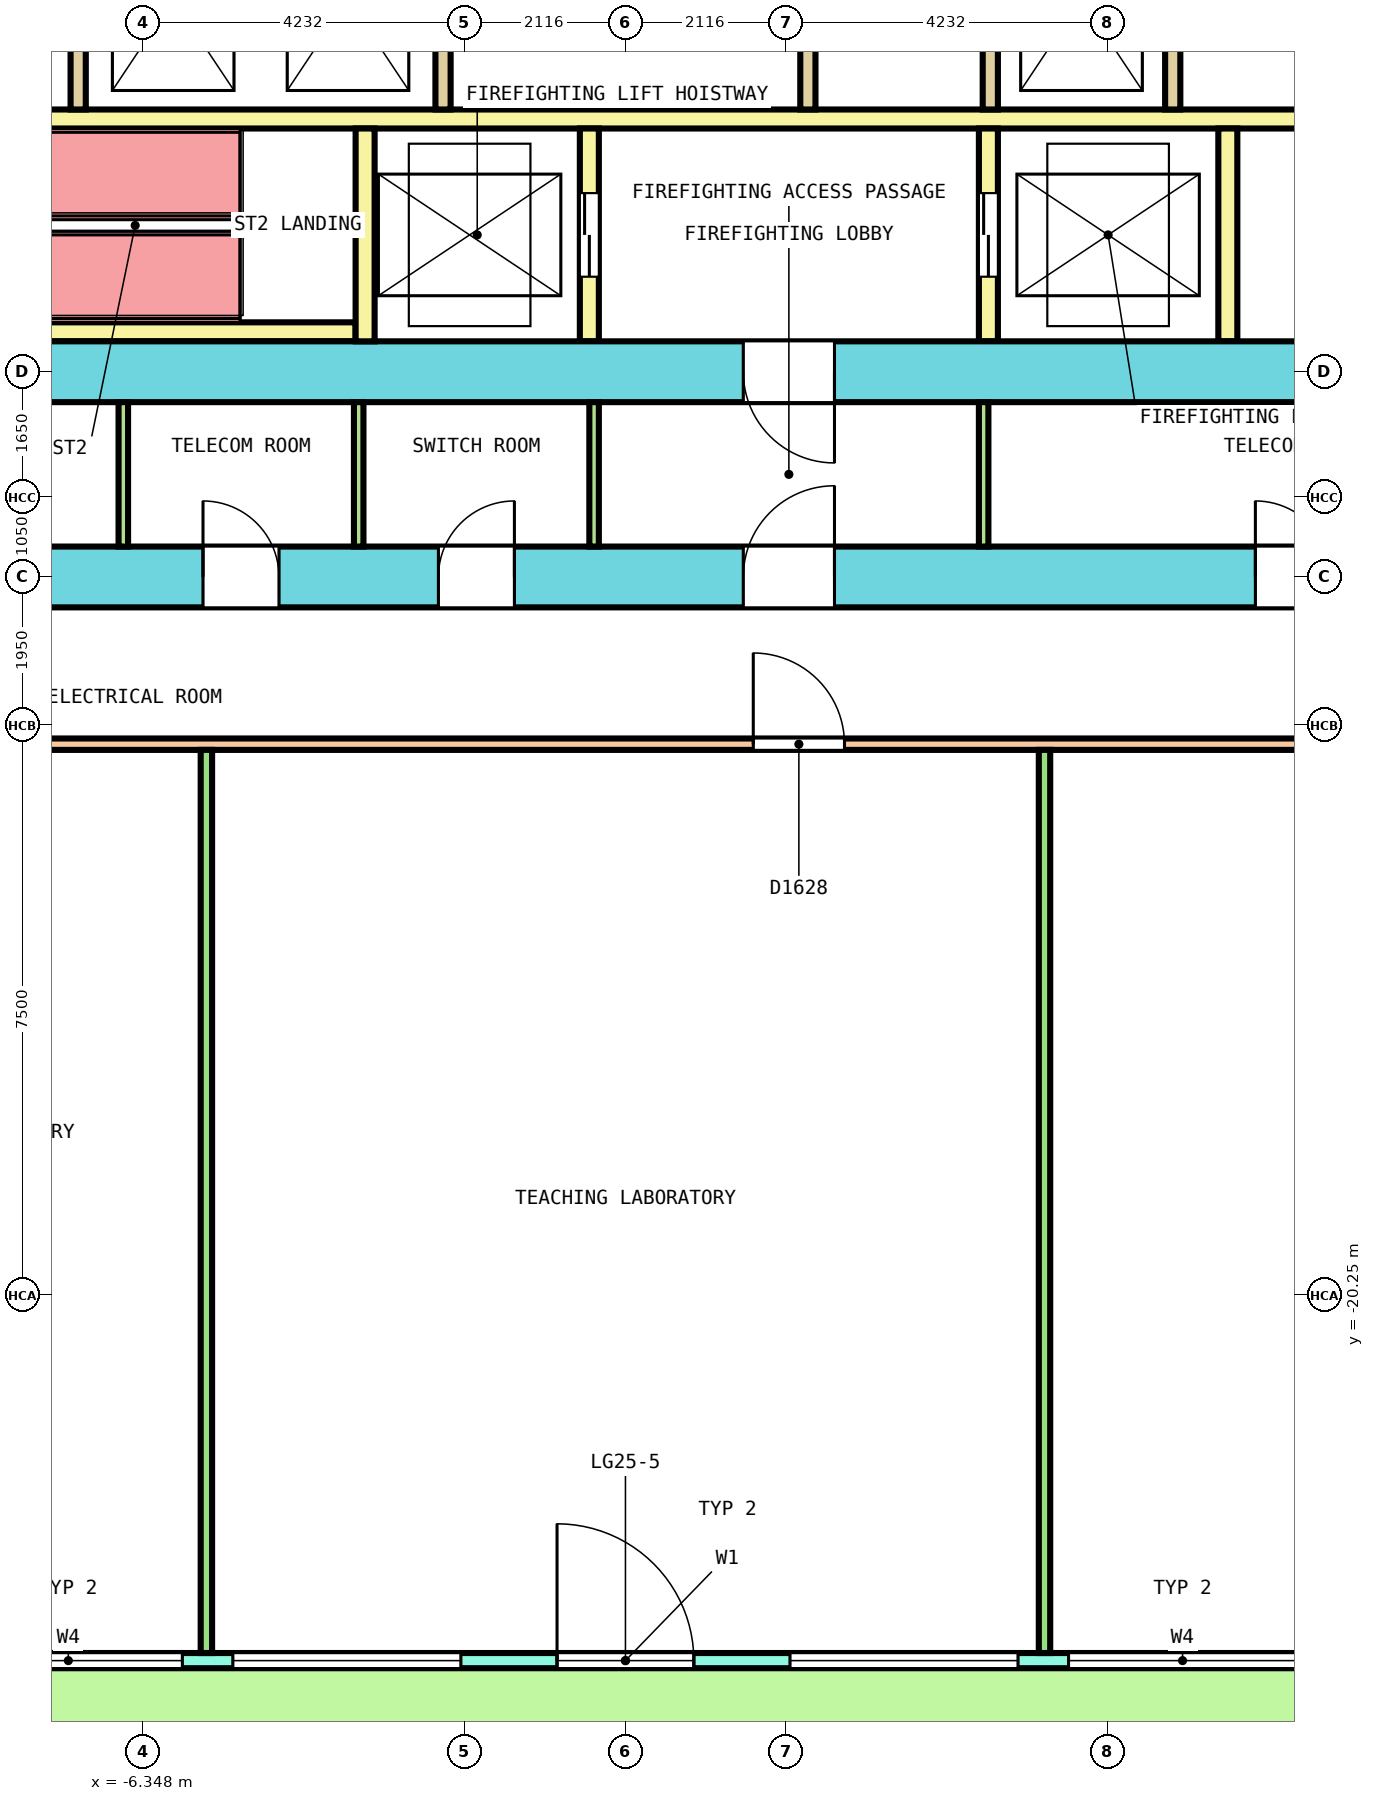
"""IFC4 building model, lengths in metres.
Left out: names, types, materials, properties, quantities, classifications, styles, units other than length and angle.
Written with IfcOpenShell. Run it as: python <this file> out.ifc"""

import sys

from ifc_helpers import new_model, si_unit, direction, frame, frame_2d, origin, place, context, subcontext, project, spatial, polyline, rectangle, outline, extrude, element, fill, save


model = new_model("IFC4")
c1 = context("Model", 3, precision=1e-05, world=origin(), true_north=direction((0.0, 1.0)))
c2 = subcontext(c1, "Body", "Model", "MODEL_VIEW")
j1 = project(units=[si_unit("LENGTHUNIT", "METRE"), si_unit("PLANEANGLEUNIT", "RADIAN")], contexts=[c1])
p1 = place(None, origin())
s1 = spatial("IfcSite", under=j1, at=p1, CompositionType="ELEMENT")
p2 = place(p1, origin())
s2 = spatial("IfcBuilding", under=s1, at=p2, CompositionType="ELEMENT")
p3 = place(p2, frame((0.0, 0.0, 117.6)))
s3 = spatial("IfcBuildingStorey", under=s2, at=p3, CompositionType="ELEMENT", Elevation=117.6)
p4 = place(p3, frame((-9.162, -25.056, 0.0), z_axis=(0.0, 0.0, 1.0), x_axis=(1.0, 0.0, 0.0)))
e1 = element("IfcWall", 1, at=p4, inside=s3, PredefinedType="SOLIDWALL", context=c2, shape_type="SweptSolid", body=[
    extrude(outline(polyline([(-0.027, -0.1), (0.994, -0.1), (2.015, -0.1), (3.036, -0.1), (4.057, -0.1), (5.078, -0.1), (6.099, -0.1), (7.12, -0.1), (8.141, -0.1), (9.162, -0.1), (10.183, -0.1), (11.204, -0.1), (12.225, -0.1), (13.246, -0.1), (14.267, -0.1), (15.288, -0.1), (16.309, -0.1), (17.33, -0.1), (18.351, -0.1), (18.297, 0.1), (17.282, 0.1), (16.267, 0.1), (15.252, 0.1), (14.237, 0.1), (13.222, 0.1), (12.207, 0.1), (11.192, 0.1), (10.177, 0.1), (9.162, 0.1), (8.147, 0.1), (7.132, 0.1), (6.117, 0.1), (5.102, 0.1), (4.087, 0.1), (3.072, 0.1), (2.057, 0.1), (1.042, 0.1), (0.027, 0.1), (-0.027, -0.1)])), origin(), (0.0, 0.0, 1.0), 4.1),
])
p5 = place(p4, frame((0.333, 0.0, 0.1)))
e2 = element("IfcOpeningElement", 2, at=p5, cuts=e1, PredefinedType="OPENING", context=c2, shape_type="SweptSolid", body=[
    extrude(rectangle(XDim=3.0, YDim=2.9, at=frame_2d((1.5, 1.45))), frame((0.0, 0.11, 0.0), z_axis=(0.0, -1.0, 0.0), x_axis=(1.0, 0.0, 0.0)), (0.0, 0.0, 1.0), 0.22),
])
p6 = place(p4, frame((3.997, 0.0, 0.1)))
e3 = element("IfcOpeningElement", 3, at=p6, cuts=e1, PredefinedType="OPENING", context=c2, shape_type="SweptSolid", body=[
    extrude(rectangle(XDim=3.0, YDim=2.9, at=frame_2d((1.5, 1.45))), frame((0.0, 0.11, 0.0), z_axis=(0.0, -1.0, 0.0), x_axis=(1.0, 0.0, 0.0)), (0.0, 0.0, 1.0), 0.22),
])
p7 = place(p4, frame((8.262, 0.0, 0.0)))
e4 = element("IfcOpeningElement", 4, at=p7, cuts=e1, PredefinedType="OPENING", context=c2, shape_type="SweptSolid", body=[
    extrude(rectangle(XDim=1.8, YDim=2.4, at=frame_2d((0.9, 1.2))), frame((0.0, 0.11, 0.0), z_axis=(0.0, -1.0, 0.0), x_axis=(1.0, 0.0, 0.0)), (0.0, 0.0, 1.0), 0.22),
])
p8 = place(p4, frame((8.262, 0.0, 2.55)))
e5 = element("IfcOpeningElement", 5, at=p8, cuts=e1, PredefinedType="OPENING", context=c2, shape_type="SweptSolid", body=[
    extrude(rectangle(XDim=1.8, YDim=0.45, at=frame_2d((0.9, 0.225))), frame((0.0, 0.11, 0.0), z_axis=(0.0, -1.0, 0.0), x_axis=(1.0, 0.0, 0.0)), (0.0, 0.0, 1.0), 0.22),
])
p9 = place(p4, frame((11.327, 0.0, 0.1)))
e6 = element("IfcOpeningElement", 6, at=p9, cuts=e1, PredefinedType="OPENING", context=c2, shape_type="SweptSolid", body=[
    extrude(rectangle(XDim=3.0, YDim=2.9, at=frame_2d((1.5, 1.45))), frame((0.0, 0.11, 0.0), z_axis=(0.0, -1.0, 0.0), x_axis=(1.0, 0.0, 0.0)), (0.0, 0.0, 1.0), 0.22),
])
p10 = place(p4, frame((14.991, 0.0, 0.1)))
e7 = element("IfcOpeningElement", 7, at=p10, cuts=e1, PredefinedType="OPENING", context=c2, shape_type="SweptSolid", body=[
    extrude(rectangle(XDim=3.0, YDim=2.9, at=frame_2d((1.5, 1.45))), frame((0.0, 0.11, 0.0), z_axis=(0.0, -1.0, 0.0), x_axis=(1.0, 0.0, 0.0)), (0.0, 0.0, 1.0), 0.22),
])
p11 = place(p3, frame((-13.6, -10.8, 0.0), z_axis=(0.0, 0.0, 1.0), x_axis=(1.0, 0.0, 0.0)))
e8 = element("IfcWall", 8, at=p11, inside=s3, PredefinedType="SHEAR", context=c2, shape_type="SweptSolid", body=[
    extrude(rectangle(XDim=27.2, YDim=0.8, at=frame_2d((13.6, 0.0))), origin(), (0.0, 0.0, 1.0), 4.1),
])
p12 = place(p11, frame((1.817, 0.0, 0.0)))
e9 = element("IfcOpeningElement", 9, at=p12, cuts=e8, PredefinedType="OPENING", context=c2, shape_type="SweptSolid", body=[
    extrude(rectangle(XDim=1.0, YDim=2.1, at=frame_2d((0.5, 1.05))), frame((0.0, 0.41, 0.0), z_axis=(0.0, -1.0, 0.0), x_axis=(1.0, 0.0, 0.0)), (0.0, 0.0, 1.0), 0.82),
])
p13 = place(p11, frame((4.945, 0.0, 0.0)))
e10 = element("IfcOpeningElement", 10, at=p13, cuts=e8, PredefinedType="OPENING", context=c2, shape_type="SweptSolid", body=[
    extrude(rectangle(XDim=1.0, YDim=2.1, at=frame_2d((0.5, 1.05))), frame((0.0, 0.41, 0.0), z_axis=(0.0, -1.0, 0.0), x_axis=(1.0, 0.0, 0.0)), (0.0, 0.0, 1.0), 0.82),
])
p14 = place(p11, frame((8.042, 0.0, 0.0)))
e11 = element("IfcOpeningElement", 11, at=p14, cuts=e8, PredefinedType="OPENING", context=c2, shape_type="SweptSolid", body=[
    extrude(rectangle(XDim=1.0, YDim=2.1, at=frame_2d((0.5, 1.05))), frame((0.0, 0.41, 0.0), z_axis=(0.0, -1.0, 0.0), x_axis=(1.0, 0.0, 0.0)), (0.0, 0.0, 1.0), 0.82),
])
p15 = place(p11, frame((11.139, 0.0, 0.0)))
e12 = element("IfcOpeningElement", 12, at=p15, cuts=e8, PredefinedType="OPENING", context=c2, shape_type="SweptSolid", body=[
    extrude(rectangle(XDim=1.0, YDim=2.1, at=frame_2d((0.5, 1.05))), frame((0.0, 0.41, 0.0), z_axis=(0.0, -1.0, 0.0), x_axis=(1.0, 0.0, 0.0)), (0.0, 0.0, 1.0), 0.82),
])
p16 = place(p11, frame((21.887, 0.0, 0.0)))
e13 = element("IfcOpeningElement", 13, at=p16, cuts=e8, PredefinedType="OPENING", context=c2, shape_type="SweptSolid", body=[
    extrude(rectangle(XDim=1.0, YDim=2.1, at=frame_2d((0.5, 1.05))), frame((0.0, 0.41, 0.0), z_axis=(0.0, -1.0, 0.0), x_axis=(1.0, 0.0, 0.0)), (0.0, 0.0, 1.0), 0.82),
])
p17 = place(p11, frame((15.15, 0.0, 0.0)))
e14 = element("IfcOpeningElement", 14, at=p17, cuts=e8, PredefinedType="OPENING", context=c2, shape_type="SweptSolid", body=[
    extrude(rectangle(XDim=1.2, YDim=2.1, at=frame_2d((0.6, 1.05))), frame((0.0, 0.41, 0.0), z_axis=(0.0, -1.0, 0.0), x_axis=(1.0, 0.0, 0.0)), (0.0, 0.0, 1.0), 0.82),
])
p18 = place(p3, frame((-12.8, -8.1, 0.0), z_axis=(0.0, 0.0, 1.0), x_axis=(1.0, 0.0, 0.0)))
e15 = element("IfcWall", 15, at=p18, inside=s3, PredefinedType="SHEAR", context=c2, shape_type="SweptSolid", body=[
    extrude(rectangle(XDim=25.6, YDim=0.8, at=frame_2d((12.8, 0.0))), origin(), (0.0, 0.0, 1.0), 4.1),
])
p19 = place(p18, frame((14.35, 0.0, 0.0)))
e16 = element("IfcOpeningElement", 16, at=p19, cuts=e15, PredefinedType="OPENING", context=c2, shape_type="SweptSolid", body=[
    extrude(rectangle(XDim=1.2, YDim=2.1, at=frame_2d((0.6, 1.05))), frame((0.0, 0.41, 0.0), z_axis=(0.0, -1.0, 0.0), x_axis=(1.0, 0.0, 0.0)), (0.0, 0.0, 1.0), 0.82),
])
p20 = place(p3, frame((-9.35, -4.775, 0.0), z_axis=(0.0, 0.0, 1.0), x_axis=(1.0, 0.0, 0.0)))
e17 = element("IfcWall", 17, at=p20, inside=s3, PredefinedType="SOLIDWALL", context=c2, shape_type="SweptSolid", body=[
    extrude(rectangle(XDim=18.7, YDim=0.25, at=frame_2d((9.35, 0.0))), origin(), (0.0, 0.0, 1.0), 4.1),
])
for number, where, z_axis, x_axis in (
    (18, (-7.2, -4.65, 0.0), (0.0, 0.0, 1.0), (0.0, 1.0, 0.0)),
    (19, (-2.4, -4.65, 0.0), (0.0, 0.0, 1.0), (0.0, 1.0, 0.0)),
    (20, (2.4, -4.65, 0.0), (0.0, 0.0, 1.0), (0.0, 1.0, 0.0)),
    (21, (4.8, -4.65, 0.0), (0.0, 0.0, 1.0), (0.0, 1.0, 0.0)),
    (22, (7.2, -4.65, 0.0), (0.0, 0.0, 1.0), (0.0, 1.0, 0.0)),
):
    element("IfcWall", number, at=place(p3, frame(where, z_axis=z_axis, x_axis=x_axis)), inside=s3, PredefinedType="SOLIDWALL", context=c2, shape_type="SweptSolid", body=[
        extrude(rectangle(XDim=2.9, YDim=0.2, at=frame_2d((1.45, 0.0))), origin(), (0.0, 0.0, 1.0), 4.1),
    ])
p21 = place(p3, frame((-9.35, -7.575, 0.0), z_axis=(0.0, 0.0, 1.0), x_axis=(1.0, 0.0, 0.0)))
e23 = element("IfcWall", 23, at=p21, inside=s3, PredefinedType="SOLIDWALL", context=c2, shape_type="SweptSolid", body=[
    extrude(rectangle(XDim=5.8, YDim=0.25, at=frame_2d((2.9, 0.0))), origin(), (0.0, 0.0, 1.0), 4.1),
])
p22 = place(p3, frame((-3.425, -7.7, 0.0), z_axis=(0.0, 0.0, 1.0), x_axis=(0.0, 1.0, 0.0)))
e24 = element("IfcWall", 24, at=p22, inside=s3, PredefinedType="SOLIDWALL", context=c2, shape_type="SweptSolid", body=[
    extrude(rectangle(XDim=2.8, YDim=0.25, at=frame_2d((1.4, 0.0))), origin(), (0.0, 0.0, 1.0), 4.1),
])
p23 = place(p3, frame((-0.475, -7.7, 0.0), z_axis=(0.0, 0.0, 1.0), x_axis=(0.0, 1.0, 0.0)))
e25 = element("IfcWall", 25, at=p23, inside=s3, PredefinedType="SOLIDWALL", context=c2, shape_type="SweptSolid", body=[
    extrude(rectangle(XDim=2.8, YDim=0.25, at=frame_2d((1.4, 0.0))), origin(), (0.0, 0.0, 1.0), 4.1),
])
p24 = place(p23, frame((0.85, 0.0, 0.0)))
e26 = element("IfcOpeningElement", 26, at=p24, cuts=e25, PredefinedType="OPENING", context=c2, shape_type="SweptSolid", body=[
    extrude(rectangle(XDim=1.1, YDim=2.1, at=frame_2d((0.55, 1.05))), frame((0.0, 0.135, 0.0), z_axis=(0.0, -1.0, 0.0), x_axis=(1.0, 0.0, 0.0)), (0.0, 0.0, 1.0), 0.27),
])
p25 = place(p3, frame((4.775, -7.7, 0.0), z_axis=(0.0, 0.0, 1.0), x_axis=(0.0, 1.0, 0.0)))
e27 = element("IfcWall", 27, at=p25, inside=s3, PredefinedType="SOLIDWALL", context=c2, shape_type="SweptSolid", body=[
    extrude(rectangle(XDim=2.8, YDim=0.25, at=frame_2d((1.4, 0.0))), origin(), (0.0, 0.0, 1.0), 4.1),
])
p26 = place(p25, frame((0.85, 0.0, 0.0)))
e28 = element("IfcOpeningElement", 28, at=p26, cuts=e27, PredefinedType="OPENING", context=c2, shape_type="SweptSolid", body=[
    extrude(rectangle(XDim=1.1, YDim=2.1, at=frame_2d((0.55, 1.05))), frame((0.0, 0.135, 0.0), z_axis=(0.0, -1.0, 0.0), x_axis=(1.0, 0.0, 0.0)), (0.0, 0.0, 1.0), 0.27),
])
p27 = place(p3, frame((7.925, -7.7, 0.0), z_axis=(0.0, 0.0, 1.0), x_axis=(0.0, 1.0, 0.0)))
e29 = element("IfcWall", 29, at=p27, inside=s3, PredefinedType="SOLIDWALL", context=c2, shape_type="SweptSolid", body=[
    extrude(rectangle(XDim=2.8, YDim=0.25, at=frame_2d((1.4, 0.0))), origin(), (0.0, 0.0, 1.0), 4.1),
])
for number, where, z_axis, x_axis in (
    (30, (-6.606, -10.4, 0.0), (0.0, 0.0, 1.0), (0.0, 1.0, 0.0)),
    (31, (-3.51, -10.4, 0.0), (0.0, 0.0, 1.0), (0.0, 1.0, 0.0)),
    (32, (-0.413, -10.4, 0.0), (0.0, 0.0, 1.0), (0.0, 1.0, 0.0)),
    (33, (4.712, -10.4, 0.0), (0.0, 0.0, 1.0), (0.0, 1.0, 0.0)),
):
    element("IfcWall", number, at=place(p3, frame(where, z_axis=z_axis, x_axis=x_axis)), inside=s3, PredefinedType="PARTITIONING", context=c2, shape_type="SweptSolid", body=[
        extrude(rectangle(XDim=1.9, YDim=0.125, at=frame_2d((0.95, 0.0))), origin(), (0.0, 0.0, 1.0), 3.05),
    ])
p28 = place(p3, frame((-15.35, -13.0, 0.0), z_axis=(0.0, 0.0, 1.0), x_axis=(1.0, 0.0, 0.0)))
e34 = element("IfcWall", 34, at=p28, inside=s3, PredefinedType="PARTITIONING", context=c2, shape_type="SweptSolid", body=[
    extrude(rectangle(XDim=30.675, YDim=0.15, at=frame_2d((15.337, 0.0))), origin(), (0.0, 0.0, 1.0), 3.05),
])
p29 = place(p28, frame((1.434, 0.0, 0.0)))
e35 = element("IfcOpeningElement", 35, at=p29, cuts=e34, PredefinedType="OPENING", context=c2, shape_type="SweptSolid", body=[
    extrude(rectangle(XDim=1.0, YDim=2.1, at=frame_2d((0.5, 1.05))), frame((0.0, 0.085, 0.0), z_axis=(0.0, -1.0, 0.0), x_axis=(1.0, 0.0, 0.0)), (0.0, 0.0, 1.0), 0.17),
])
p30 = place(p28, frame((5.183, 0.0, 0.0)))
e36 = element("IfcOpeningElement", 36, at=p30, cuts=e34, PredefinedType="OPENING", context=c2, shape_type="SweptSolid", body=[
    extrude(rectangle(XDim=1.2, YDim=2.1, at=frame_2d((0.6, 1.05))), frame((0.0, 0.085, 0.0), z_axis=(0.0, -1.0, 0.0), x_axis=(1.0, 0.0, 0.0)), (0.0, 0.0, 1.0), 0.17),
])
p31 = place(p28, frame((17.031, 0.0, 0.0)))
e37 = element("IfcOpeningElement", 37, at=p31, cuts=e34, PredefinedType="OPENING", context=c2, shape_type="SweptSolid", body=[
    extrude(rectangle(XDim=1.2, YDim=2.1, at=frame_2d((0.6, 1.05))), frame((0.0, 0.085, 0.0), z_axis=(0.0, -1.0, 0.0), x_axis=(1.0, 0.0, 0.0)), (0.0, 0.0, 1.0), 0.17),
])
p32 = place(p28, frame((26.405, 0.0, 0.0)))
e38 = element("IfcOpeningElement", 38, at=p32, cuts=e34, PredefinedType="OPENING", context=c2, shape_type="SweptSolid", body=[
    extrude(rectangle(XDim=1.2, YDim=2.1, at=frame_2d((0.6, 1.05))), frame((0.0, 0.085, 0.0), z_axis=(0.0, -1.0, 0.0), x_axis=(1.0, 0.0, 0.0)), (0.0, 0.0, 1.0), 0.17),
])
for number, where, z_axis, x_axis in (
    (39, (-5.513, -24.957, 0.0), (0.0, 0.0, 1.0), (0.0, 1.0, 0.0)),
    (40, (5.513, -24.957, 0.0), (0.0, 0.0, 1.0), (0.0, 1.0, 0.0)),
):
    element("IfcWall", number, at=place(p3, frame(where, z_axis=z_axis, x_axis=x_axis)), inside=s3, PredefinedType="PARTITIONING", context=c2, shape_type="SweptSolid", body=[
        extrude(rectangle(XDim=11.882, YDim=0.15, at=frame_2d((5.941, 0.0))), origin(), (0.0, 0.0, 1.0), 3.05),
    ])
p33 = place(p5, origin())
e41 = element("IfcWindow", 41, at=p33, inside=s3, PartitioningType="SINGLE_PANEL", PredefinedType="WINDOW", context=c2, shape_type="SweptSolid", body=[
    extrude(rectangle(XDim=3.0, YDim=2.9, at=frame_2d((1.5, 1.45))), frame((0.0, 0.03, 0.0), z_axis=(0.0, -1.0, 0.0), x_axis=(1.0, 0.0, 0.0)), (0.0, 0.0, 1.0), 0.06),
])
fill(e2, e41)
p34 = place(p6, origin())
e42 = element("IfcWindow", 42, at=p34, inside=s3, PartitioningType="SINGLE_PANEL", PredefinedType="WINDOW", context=c2, shape_type="SweptSolid", body=[
    extrude(rectangle(XDim=3.0, YDim=2.9, at=frame_2d((1.5, 1.45))), frame((0.0, 0.03, 0.0), z_axis=(0.0, -1.0, 0.0), x_axis=(1.0, 0.0, 0.0)), (0.0, 0.0, 1.0), 0.06),
])
fill(e3, e42)
p35 = place(p7, origin())
e43 = element("IfcDoor", 43, at=p35, inside=s3, OperationType="DOUBLE_DOOR_SINGLE_SWING", PredefinedType="DOOR", context=c2, shape_type="SweptSolid", body=[
    extrude(rectangle(XDim=1.8, YDim=2.4, at=frame_2d((0.9, 1.2))), frame((0.0, 0.025, 0.0), z_axis=(0.0, -1.0, 0.0), x_axis=(1.0, 0.0, 0.0)), (0.0, 0.0, 1.0), 0.05),
])
fill(e4, e43)
p36 = place(p8, origin())
e44 = element("IfcWindow", 44, at=p36, inside=s3, PartitioningType="SINGLE_PANEL", PredefinedType="WINDOW", context=c2, shape_type="SweptSolid", body=[
    extrude(rectangle(XDim=1.8, YDim=0.45, at=frame_2d((0.9, 0.225))), frame((0.0, 0.03, 0.0), z_axis=(0.0, -1.0, 0.0), x_axis=(1.0, 0.0, 0.0)), (0.0, 0.0, 1.0), 0.06),
])
fill(e5, e44)
p37 = place(p9, origin())
e45 = element("IfcWindow", 45, at=p37, inside=s3, PartitioningType="SINGLE_PANEL", PredefinedType="WINDOW", context=c2, shape_type="SweptSolid", body=[
    extrude(rectangle(XDim=3.0, YDim=2.9, at=frame_2d((1.5, 1.45))), frame((0.0, 0.03, 0.0), z_axis=(0.0, -1.0, 0.0), x_axis=(1.0, 0.0, 0.0)), (0.0, 0.0, 1.0), 0.06),
])
fill(e6, e45)
p38 = place(p10, origin())
e46 = element("IfcWindow", 46, at=p38, inside=s3, PartitioningType="SINGLE_PANEL", PredefinedType="WINDOW", context=c2, shape_type="SweptSolid", body=[
    extrude(rectangle(XDim=3.0, YDim=2.9, at=frame_2d((1.5, 1.45))), frame((0.0, 0.03, 0.0), z_axis=(0.0, -1.0, 0.0), x_axis=(1.0, 0.0, 0.0)), (0.0, 0.0, 1.0), 0.06),
])
fill(e7, e46)
p39 = place(p24, origin())
e47 = element("IfcDoor", 47, at=p39, inside=s3, OperationType="DOUBLE_DOOR_SLIDING", PredefinedType="DOOR", context=c2, shape_type="SweptSolid", body=[
    extrude(rectangle(XDim=1.1, YDim=2.1, at=frame_2d((0.55, 1.05))), frame((0.0, 0.075, 0.0), z_axis=(0.0, -1.0, 0.0), x_axis=(1.0, 0.0, 0.0)), (0.0, 0.0, 1.0), 0.15),
])
fill(e26, e47)
p40 = place(p26, origin())
e48 = element("IfcDoor", 48, at=p40, inside=s3, OperationType="DOUBLE_DOOR_SLIDING", PredefinedType="DOOR", context=c2, shape_type="SweptSolid", body=[
    extrude(rectangle(XDim=1.1, YDim=2.1, at=frame_2d((0.55, 1.05))), frame((0.0, 0.075, 0.0), z_axis=(0.0, -1.0, 0.0), x_axis=(1.0, 0.0, 0.0)), (0.0, 0.0, 1.0), 0.15),
])
fill(e28, e48)
p41 = place(p19, origin())
e49 = element("IfcDoor", 49, at=p41, inside=s3, OperationType="SINGLE_SWING_LEFT", PredefinedType="DOOR", context=c2, shape_type="SweptSolid", body=[
    extrude(rectangle(XDim=1.2, YDim=2.1, at=frame_2d((0.6, 1.05))), frame((0.0, 0.3, 0.0), z_axis=(0.0, -1.0, 0.0), x_axis=(1.0, 0.0, 0.0)), (0.0, 0.0, 1.0), 0.6),
])
fill(e16, e49)
p42 = place(p14, origin())
e50 = element("IfcDoor", 50, at=p42, inside=s3, OperationType="SINGLE_SWING_RIGHT", PredefinedType="DOOR", context=c2, shape_type="SweptSolid", body=[
    extrude(rectangle(XDim=1.0, YDim=2.1, at=frame_2d((0.5, 1.05))), frame((0.0, 0.3, 0.0), z_axis=(0.0, -1.0, 0.0), x_axis=(1.0, 0.0, 0.0)), (0.0, 0.0, 1.0), 0.6),
])
fill(e11, e50)
p43 = place(p15, origin())
e51 = element("IfcDoor", 51, at=p43, inside=s3, OperationType="SINGLE_SWING_LEFT", PredefinedType="DOOR", context=c2, shape_type="SweptSolid", body=[
    extrude(rectangle(XDim=1.0, YDim=2.1, at=frame_2d((0.5, 1.05))), frame((0.0, 0.3, 0.0), z_axis=(0.0, -1.0, 0.0), x_axis=(1.0, 0.0, 0.0)), (0.0, 0.0, 1.0), 0.6),
])
fill(e12, e51)
p44 = place(p16, origin())
e52 = element("IfcDoor", 52, at=p44, inside=s3, OperationType="SINGLE_SWING_RIGHT", PredefinedType="DOOR", context=c2, shape_type="SweptSolid", body=[
    extrude(rectangle(XDim=1.0, YDim=2.1, at=frame_2d((0.5, 1.05))), frame((0.0, 0.3, 0.0), z_axis=(0.0, -1.0, 0.0), x_axis=(1.0, 0.0, 0.0)), (0.0, 0.0, 1.0), 0.6),
])
fill(e13, e52)
p45 = place(p17, origin())
e53 = element("IfcDoor", 53, at=p45, inside=s3, OperationType="SINGLE_SWING_LEFT", PredefinedType="DOOR", context=c2, shape_type="SweptSolid", body=[
    extrude(rectangle(XDim=1.2, YDim=2.1, at=frame_2d((0.6, 1.05))), frame((0.0, 0.3, 0.0), z_axis=(0.0, -1.0, 0.0), x_axis=(1.0, 0.0, 0.0)), (0.0, 0.0, 1.0), 0.6),
])
fill(e14, e53)
p46 = place(p31, origin())
e54 = element("IfcDoor", 54, at=p46, inside=s3, OperationType="DOUBLE_DOOR_SINGLE_SWING", PredefinedType="DOOR", context=c2, shape_type="SweptSolid", body=[
    extrude(rectangle(XDim=1.2, YDim=2.1, at=frame_2d((0.6, 1.05))), frame((0.0, 0.025, 0.0), z_axis=(0.0, -1.0, 0.0), x_axis=(1.0, 0.0, 0.0)), (0.0, 0.0, 1.0), 0.05),
])
fill(e37, e54)
save(model, sys.argv[1])
